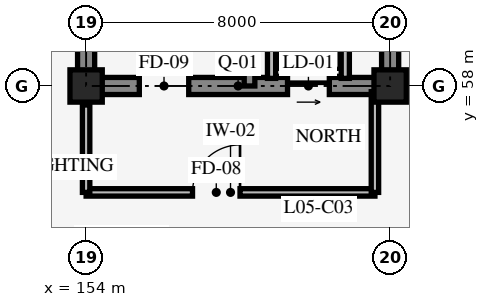
"""IFC4 building model, lengths in metres.
Left out: names, types, materials, properties, quantities, classifications, styles, units other than length and angle.
Written with IfcOpenShell. Run it as: python <this file> out.ifc"""

import sys

from ifc_helpers import new_model, si_unit, direction, frame, frame_2d, origin, origin_2d, place, context, subcontext, project, spatial, rectangle, extrude, element, fill, save


model = new_model("IFC4")
c1 = context("Model", 3, precision=1e-05, world=origin(), true_north=direction((0.0, 1.0)))
c2 = subcontext(c1, "Body", "Model", "MODEL_VIEW")
j1 = project(units=[si_unit("LENGTHUNIT", "METRE"), si_unit("PLANEANGLEUNIT", "RADIAN")], contexts=[c1])
p1 = place(None, origin())
s1 = spatial("IfcSite", under=j1, at=p1, CompositionType="ELEMENT")
p2 = place(p1, origin())
s2 = spatial("IfcBuilding", under=s1, at=p2, CompositionType="ELEMENT")
p3 = place(p2, frame((0.0, 0.0, 19.2)))
s3 = spatial("IfcBuildingStorey", under=s2, at=p3, CompositionType="ELEMENT", Elevation=19.2)
p4 = place(p3, frame((154.0, 58.0, 0.0), z_axis=(0.0, 0.0, 1.0), x_axis=(1.0, 0.0, 0.0)))
e1 = element("IfcWall", 1, at=p4, inside=s3, PredefinedType="SHEAR", context=c2, shape_type="SweptSolid", body=[
    extrude(rectangle(XDim=8.0, YDim=0.45, at=frame_2d((4.0, 0.0))), origin(), (0.0, 0.0, 1.0), 3.95),
])
p5 = place(p4, frame((1.4, 0.0, 0.0)))
e2 = element("IfcOpeningElement", 2, at=p5, cuts=e1, PredefinedType="OPENING", context=c2, shape_type="SweptSolid", body=[
    extrude(rectangle(XDim=1.3, YDim=2.15, at=frame_2d((0.65, 1.075))), frame((0.0, 0.235, 0.0), z_axis=(0.0, -1.0, 0.0), x_axis=(1.0, 0.0, 0.0)), (0.0, 0.0, 1.0), 0.47),
])
p6 = place(p4, frame((5.3, 0.0, 0.0)))
e3 = element("IfcOpeningElement", 3, at=p6, cuts=e1, PredefinedType="OPENING", context=c2, shape_type="SweptSolid", body=[
    extrude(rectangle(XDim=1.1, YDim=2.2, at=frame_2d((0.55, 1.1))), frame((0.0, 0.235, 0.0), z_axis=(0.0, -1.0, 0.0), x_axis=(1.0, 0.0, 0.0)), (0.0, 0.0, 1.0), 0.47),
])
p7 = place(p3, frame((162.0, 58.0, 0.0), z_axis=(0.0, 0.0, 1.0), x_axis=(0.0, 1.0, 0.0)))
e4 = element("IfcWall", 4, at=p7, inside=s3, PredefinedType="SHEAR", context=c2, shape_type="SweptSolid", body=[
    extrude(rectangle(XDim=8.0, YDim=0.45, at=frame_2d((4.0, 0.0))), origin(), (0.0, 0.0, 1.0), 3.95),
])
p8 = place(p7, frame((3.275, 0.0, 0.0)))
e5 = element("IfcOpeningElement", 5, at=p8, cuts=e4, PredefinedType="OPENING", context=c2, shape_type="SweptSolid", body=[
    extrude(rectangle(XDim=1.05, YDim=2.2, at=frame_2d((0.525, 1.1))), frame((0.0, 0.235, 0.0), z_axis=(0.0, -1.0, 0.0), x_axis=(1.0, 0.0, 0.0)), (0.0, 0.0, 1.0), 0.47),
])
p9 = place(p7, frame((5.45, 0.0, 0.0)))
e6 = element("IfcOpeningElement", 6, at=p9, cuts=e4, PredefinedType="OPENING", context=c2, shape_type="SweptSolid", body=[
    extrude(rectangle(XDim=1.4, YDim=2.3, at=frame_2d((0.7, 1.15))), frame((0.0, 0.235, 0.0), z_axis=(0.0, -1.0, 0.0), x_axis=(1.0, 0.0, 0.0)), (0.0, 0.0, 1.0), 0.47),
])
p10 = place(p3, frame((154.0, 66.0, 0.0), z_axis=(0.0, 0.0, 1.0), x_axis=(0.0, -1.0, 0.0)))
e7 = element("IfcWall", 7, at=p10, inside=s3, PredefinedType="SHEAR", context=c2, shape_type="SweptSolid", body=[
    extrude(rectangle(XDim=8.0, YDim=0.45, at=frame_2d((4.0, 0.0))), origin(), (0.0, 0.0, 1.0), 3.95),
])
p11 = place(p3, frame((158.3, 58.0, 0.0), z_axis=(0.0, 0.0, 1.0), x_axis=(0.0, 1.0, 0.0)))
e8 = element("IfcWall", 8, at=p11, inside=s3, PredefinedType="SHEAR", context=c2, shape_type="SweptSolid", body=[
    extrude(rectangle(XDim=8.0, YDim=0.28, at=frame_2d((4.0, 0.0))), origin(), (0.0, 0.0, 1.0), 3.95),
])
for number, where, z_axis, x_axis in (
    (9, (154.0, 58.0, 0.0), (0.0, 0.0, 1.0), (1.0, 0.0, 0.0)),
    (10, (162.0, 58.0, 0.0), (0.0, 0.0, 1.0), (1.0, 0.0, 0.0)),
):
    element("IfcColumn", number, at=place(p3, frame(where, z_axis=z_axis, x_axis=x_axis)), inside=s3, PredefinedType="COLUMN", context=c2, shape_type="SweptSolid", body=[
        extrude(rectangle(XDim=0.85, YDim=0.85, at=origin_2d()), origin(), (0.0, 0.0, 1.0), 4.2),
    ])
for number, where, z_axis, x_axis in (
    (11, (160.82, 58.2, 0.0), (0.0, 0.0, 1.0), (0.0, 1.0, 0.0)),
    (12, (158.88, 58.2, 0.0), (0.0, 0.0, 1.0), (0.0, 1.0, 0.0)),
):
    element("IfcWall", number, at=place(p3, frame(where, z_axis=z_axis, x_axis=x_axis)), inside=s3, PredefinedType="STANDARD", context=c2, shape_type="SweptSolid", body=[
        extrude(rectangle(XDim=2.55, YDim=0.215, at=frame_2d((1.275, 0.0))), origin(), (0.0, 0.0, 1.0), 3.9),
    ])
p12 = place(p3, frame((154.0, 55.2, 0.0), z_axis=(0.0, 0.0, 1.0), x_axis=(1.0, 0.0, 0.0)))
e13 = element("IfcWall", 13, at=p12, inside=s3, PredefinedType="STANDARD", context=c2, shape_type="SweptSolid", body=[
    extrude(rectangle(XDim=7.6, YDim=0.195, at=frame_2d((3.8, 0.0))), origin(), (0.0, 0.0, 1.0), 3.9),
])
p13 = place(p12, frame((2.8, 0.0, 0.0)))
e14 = element("IfcOpeningElement", 14, at=p13, cuts=e13, PredefinedType="OPENING", context=c2, shape_type="SweptSolid", body=[
    extrude(rectangle(XDim=1.25, YDim=2.15, at=frame_2d((0.625, 1.075))), frame((0.0, 0.107, 0.0), z_axis=(0.0, -1.0, 0.0), x_axis=(1.0, 0.0, 0.0)), (0.0, 0.0, 1.0), 0.215),
])
p14 = place(p3, frame((161.6, 55.2, 0.0), z_axis=(0.0, 0.0, 1.0), x_axis=(0.0, 1.0, 0.0)))
e15 = element("IfcWall", 15, at=p14, inside=s3, PredefinedType="STANDARD", context=c2, shape_type="SweptSolid", body=[
    extrude(rectangle(XDim=2.65, YDim=0.195, at=frame_2d((1.325, 0.0))), origin(), (0.0, 0.0, 1.0), 3.19),
])
p15 = place(p3, frame((154.0, 55.2, 0.0), z_axis=(0.0, 0.0, 1.0), x_axis=(0.0, 1.0, 0.0)))
e16 = element("IfcWall", 16, at=p15, inside=s3, PredefinedType="STANDARD", context=c2, shape_type="SweptSolid", body=[
    extrude(rectangle(XDim=2.3, YDim=0.195, at=frame_2d((1.15, 0.0))), origin(), (0.0, 0.0, 1.0), 3.19),
])
p16 = place(p5, origin())
e17 = element("IfcDoor", 17, at=p16, inside=s3, OperationType="SINGLE_SWING_RIGHT", PredefinedType="DOOR", context=c2, shape_type="SweptSolid", body=[
    extrude(rectangle(XDim=1.3, YDim=2.15, at=frame_2d((0.65, 1.075))), frame((0.0, 0.025, 0.0), z_axis=(0.0, -1.0, 0.0), x_axis=(1.0, 0.0, 0.0)), (0.0, 0.0, 1.0), 0.05),
])
fill(e2, e17)
p17 = place(p6, origin())
e18 = element("IfcDoor", 18, at=p17, inside=s3, OperationType="SLIDING_TO_RIGHT", PredefinedType="DOOR", context=c2, shape_type="SweptSolid", body=[
    extrude(rectangle(XDim=1.1, YDim=2.2, at=frame_2d((0.55, 1.1))), frame((0.0, 0.025, 0.0), z_axis=(0.0, -1.0, 0.0), x_axis=(1.0, 0.0, 0.0)), (0.0, 0.0, 1.0), 0.05),
])
fill(e3, e18)
p18 = place(p13, origin())
e19 = element("IfcDoor", 19, at=p18, inside=s3, OperationType="SINGLE_SWING_RIGHT", PredefinedType="DOOR", context=c2, shape_type="SweptSolid", body=[
    extrude(rectangle(XDim=1.25, YDim=2.15, at=frame_2d((0.625, 1.075))), frame((0.0, 0.025, 0.0), z_axis=(0.0, -1.0, 0.0), x_axis=(1.0, 0.0, 0.0)), (0.0, 0.0, 1.0), 0.05),
])
fill(e14, e19)
save(model, sys.argv[1])
